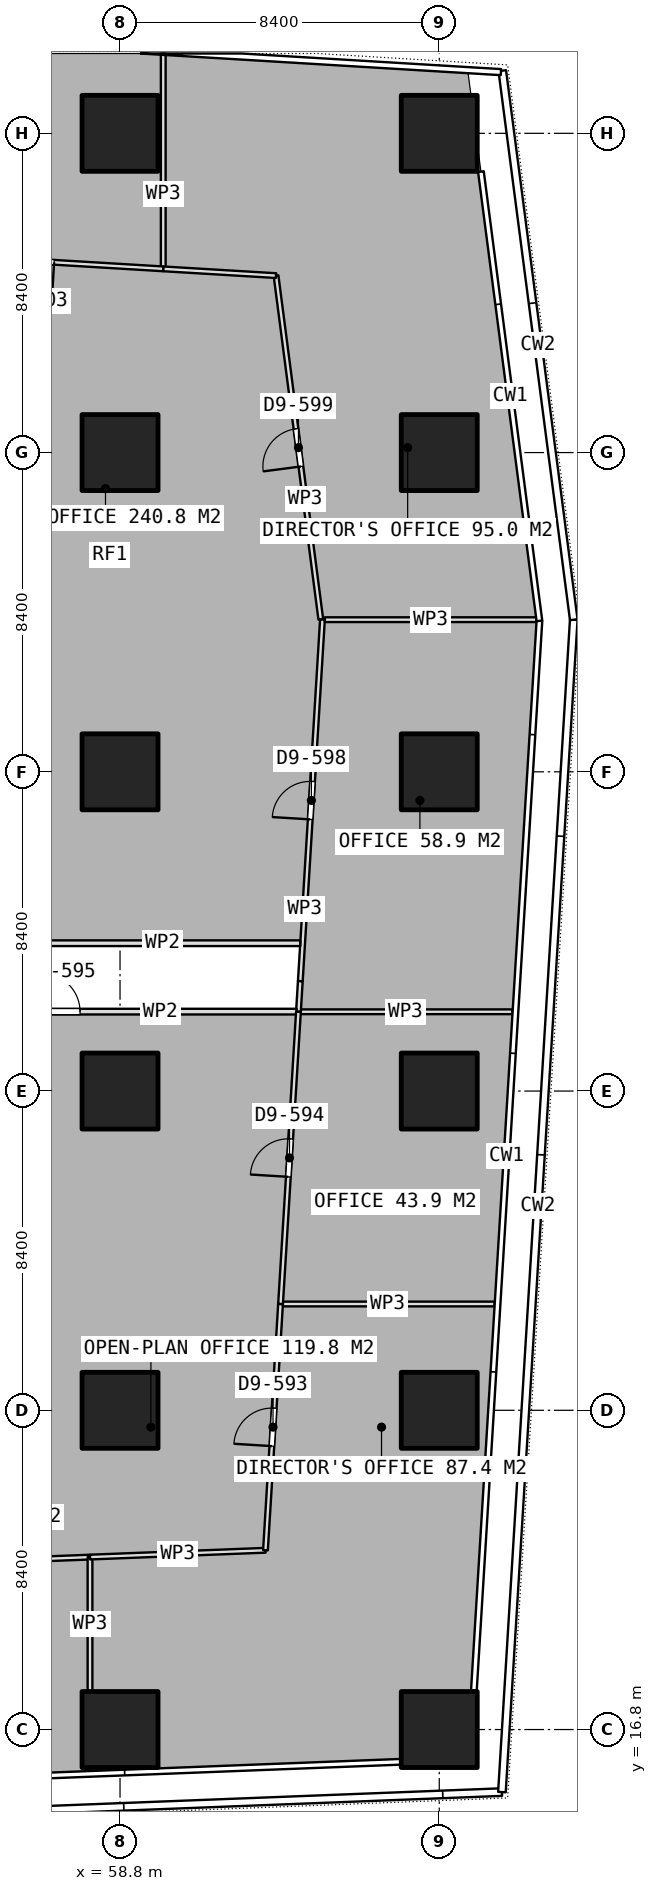
"""IFC4 building model, lengths in metres.
Left out: names, types, materials, properties, quantities, classifications, styles, units other than length and angle.
Written with IfcOpenShell. Run it as: python <this file> out.ifc"""

import sys

from ifc_helpers import new_model, si_unit, direction, frame, frame_2d, origin, origin_2d, place, context, subcontext, project, spatial, rectangle, extrude, element, fill, save


model = new_model("IFC4")
c1 = context("Model", 3, precision=1e-05, world=origin(), true_north=direction((0.0, 1.0)))
c2 = subcontext(c1, "Body", "Model", "MODEL_VIEW")
j1 = project(units=[si_unit("LENGTHUNIT", "METRE"), si_unit("PLANEANGLEUNIT", "RADIAN")], contexts=[c1])
p1 = place(None, origin())
s1 = spatial("IfcSite", under=j1, at=p1, CompositionType="ELEMENT")
p2 = place(p1, origin())
s2 = spatial("IfcBuilding", under=s1, at=p2, CompositionType="ELEMENT")
p3 = place(p2, frame((0.0, 0.0, 147.8)))
s3 = spatial("IfcBuildingStorey", under=s2, at=p3, CompositionType="ELEMENT", Elevation=147.8)
for number, where, z_axis, x_axis in (
    (1, (58.8, 16.8, 0.0), (0.0, 0.0, 1.0), (1.0, 0.0, 0.0)),
    (2, (58.8, 25.2, 0.0), (0.0, 0.0, 1.0), (1.0, 0.0, 0.0)),
    (3, (58.8, 33.6, 0.0), (0.0, 0.0, 1.0), (1.0, 0.0, 0.0)),
    (4, (58.8, 42.0, 0.0), (0.0, 0.0, 1.0), (1.0, 0.0, 0.0)),
    (5, (58.8, 50.4, 0.0), (0.0, 0.0, 1.0), (1.0, 0.0, 0.0)),
    (6, (58.8, 58.8, 0.0), (0.0, 0.0, 1.0), (1.0, 0.0, 0.0)),
    (7, (67.2, 16.8, 0.0), (0.0, 0.0, 1.0), (1.0, 0.0, 0.0)),
    (8, (67.2, 25.2, 0.0), (0.0, 0.0, 1.0), (1.0, 0.0, 0.0)),
    (9, (67.2, 33.6, 0.0), (0.0, 0.0, 1.0), (1.0, 0.0, 0.0)),
    (10, (67.2, 42.0, 0.0), (0.0, 0.0, 1.0), (1.0, 0.0, 0.0)),
    (11, (67.2, 50.4, 0.0), (0.0, 0.0, 1.0), (1.0, 0.0, 0.0)),
    (12, (67.2, 58.8, 0.0), (0.0, 0.0, 1.0), (1.0, 0.0, 0.0)),
):
    element("IfcColumn", number, at=place(p3, frame(where, z_axis=z_axis, x_axis=x_axis)), inside=s3, PredefinedType="COLUMN", context=c2, shape_type="SweptSolid", body=[
        extrude(rectangle(XDim=2.0, YDim=2.0, at=origin_2d()), origin(), (0.0, 0.0, 1.0), 3.75),
    ])
p4 = place(p3, frame((56.475, 21.278, 0.0), z_axis=(0.0, 0.0, 1.0), x_axis=(0.999266096652, 0.038304935469, 0.0)))
e13 = element("IfcWall", 13, at=p4, inside=s3, PredefinedType="PARTITIONING", context=c2, shape_type="SweptSolid", body=[
    extrude(rectangle(XDim=1.536, YDim=0.125, at=frame_2d((0.768, 0.0))), origin(), (0.0, 0.0, 1.0), 3.5),
])
p5 = place(p3, frame((58.01, 21.337, 0.0), z_axis=(0.0, 0.0, 1.0), x_axis=(0.0, -1.0, 0.0)))
e14 = element("IfcWall", 14, at=p5, inside=s3, PredefinedType="PARTITIONING", context=c2, shape_type="SweptSolid", body=[
    extrude(rectangle(XDim=3.517, YDim=0.125, at=frame_2d((1.758, 0.0))), origin(), (0.0, 0.0, 1.0), 3.5),
])
p6 = place(p3, frame((63.024, 27.997, 0.0), z_axis=(0.0, 0.0, 1.0), x_axis=(1.0, 0.0, 0.0)))
e15 = element("IfcWall", 15, at=p6, inside=s3, PredefinedType="PARTITIONING", context=c2, shape_type="SweptSolid", body=[
    extrude(rectangle(XDim=5.631, YDim=0.125, at=frame_2d((2.815, 0.0))), origin(), (0.0, 0.0, 1.0), 3.5),
])
p7 = place(p3, frame((58.011, 21.338, 0.0), z_axis=(0.0, 0.0, 1.0), x_axis=(0.999247292376, 0.038792379151, 0.0)))
e16 = element("IfcWall", 16, at=p7, inside=s3, PredefinedType="PARTITIONING", context=c2, shape_type="SweptSolid", body=[
    extrude(rectangle(XDim=4.619, YDim=0.125, at=frame_2d((2.31, 0.0))), origin(), (0.0, 0.0, 1.0), 3.5),
])
p8 = place(p3, frame((62.627, 21.517, 0.0), z_axis=(0.0, 0.0, 1.0), x_axis=(0.061146763842, 0.998128785915, 0.0)))
e17 = element("IfcWall", 17, at=p8, inside=s3, PredefinedType="PARTITIONING", context=c2, shape_type="SweptSolid", body=[
    extrude(rectangle(XDim=6.492, YDim=0.125, at=frame_2d((3.246, 0.0))), origin(), (0.0, 0.0, 1.0), 3.5),
])
p9 = place(p8, frame((2.746, 0.0, 0.0)))
e18 = element("IfcOpeningElement", 18, at=p9, cuts=e17, PredefinedType="OPENING", context=c2, shape_type="SweptSolid", body=[
    extrude(rectangle(XDim=1.0, YDim=2.1, at=frame_2d((0.5, 1.05))), frame((0.0, 0.073, 0.0), z_axis=(0.0, -1.0, 0.0), x_axis=(1.0, 0.0, 0.0)), (0.0, 0.0, 1.0), 0.145),
])
p10 = place(p3, frame((63.024, 27.998, 0.0), z_axis=(0.0, 0.0, 1.0), x_axis=(0.061174508596, 0.998127085845, 0.0)))
e19 = element("IfcWall", 19, at=p10, inside=s3, PredefinedType="PARTITIONING", context=c2, shape_type="SweptSolid", body=[
    extrude(rectangle(XDim=7.702, YDim=0.125, at=frame_2d((3.851, 0.0))), origin(), (0.0, 0.0, 1.0), 3.5),
])
p11 = place(p10, frame((3.351, 0.0, 0.0)))
e20 = element("IfcOpeningElement", 20, at=p11, cuts=e19, PredefinedType="OPENING", context=c2, shape_type="SweptSolid", body=[
    extrude(rectangle(XDim=1.0, YDim=2.1, at=frame_2d((0.5, 1.05))), frame((0.0, 0.073, 0.0), z_axis=(0.0, -1.0, 0.0), x_axis=(1.0, 0.0, 0.0)), (0.0, 0.0, 1.0), 0.145),
])
p12 = place(p3, frame((63.495, 35.686, 0.0), z_axis=(0.0, 0.0, 1.0), x_axis=(1.0, 0.0, 0.0)))
e21 = element("IfcWall", 21, at=p12, inside=s3, PredefinedType="PARTITIONING", context=c2, shape_type="SweptSolid", body=[
    extrude(rectangle(XDim=5.631, YDim=0.125, at=frame_2d((2.815, 0.0))), origin(), (0.0, 0.0, 1.0), 3.5),
])
p13 = place(p3, frame((63.544, 36.491, 0.0), z_axis=(0.0, 0.0, 1.0), x_axis=(0.061131923864, 0.998129694922, 0.0)))
e22 = element("IfcWall", 22, at=p13, inside=s3, PredefinedType="PARTITIONING", context=c2, shape_type="SweptSolid", body=[
    extrude(rectangle(XDim=9.537, YDim=0.125, at=frame_2d((4.769, 0.0))), origin(), (0.0, 0.0, 1.0), 3.5),
])
p14 = place(p13, frame((4.265, 0.0, 0.0)))
e23 = element("IfcOpeningElement", 23, at=p14, cuts=e22, PredefinedType="OPENING", context=c2, shape_type="SweptSolid", body=[
    extrude(rectangle(XDim=1.0, YDim=2.1, at=frame_2d((0.5, 1.05))), frame((0.0, 0.073, 0.0), z_axis=(0.0, -1.0, 0.0), x_axis=(1.0, 0.0, 0.0)), (0.0, 0.0, 1.0), 0.145),
])
p15 = place(p3, frame((64.189, 46.003, 0.0), z_axis=(0.0, 0.0, 1.0), x_axis=(1.0, 0.0, 0.0)))
e24 = element("IfcWall", 24, at=p15, inside=s3, PredefinedType="PARTITIONING", context=c2, shape_type="SweptSolid", body=[
    extrude(rectangle(XDim=5.562, YDim=0.125, at=frame_2d((2.781, 0.0))), origin(), (0.0, 0.0, 1.0), 3.5),
])
p16 = place(p3, frame((63.495, 35.687, 0.0), z_axis=(0.0, 0.0, 1.0), x_axis=(0.060623183924, 0.998160723316, 0.0)))
e25 = element("IfcWall", 25, at=p16, inside=s3, PredefinedType="PARTITIONING", context=c2, shape_type="SweptSolid", body=[
    extrude(rectangle(XDim=0.805, YDim=0.125, at=frame_2d((0.403, 0.0))), origin(), (0.0, 0.0, 1.0), 3.5),
])
p17 = place(p3, frame((59.937, 55.234, 0.0), z_axis=(0.0, 0.0, 1.0), x_axis=(0.0, 1.0, 0.0)))
e26 = element("IfcWall", 26, at=p17, inside=s3, PredefinedType="PARTITIONING", context=c2, shape_type="SweptSolid", body=[
    extrude(rectangle(XDim=5.66, YDim=0.125, at=frame_2d((2.83, 0.0))), origin(), (0.0, 0.0, 1.0), 3.5),
])
p18 = place(p3, frame((64.083, 46.013, 0.0), z_axis=(0.0, 0.0, 1.0), x_axis=(-0.129173227862, 0.991622043525, 0.0)))
e27 = element("IfcWall", 27, at=p18, inside=s3, PredefinedType="PARTITIONING", context=c2, shape_type="SweptSolid", body=[
    extrude(rectangle(XDim=9.119, YDim=0.125, at=frame_2d((4.56, 0.0))), origin(), (0.0, 0.0, 1.0), 3.5),
])
p19 = place(p18, frame((4.055, 0.0, 0.0)))
e28 = element("IfcOpeningElement", 28, at=p19, cuts=e27, PredefinedType="OPENING", context=c2, shape_type="SweptSolid", body=[
    extrude(rectangle(XDim=1.0, YDim=2.1, at=frame_2d((0.5, 1.05))), frame((0.0, 0.073, 0.0), z_axis=(0.0, -1.0, 0.0), x_axis=(1.0, 0.0, 0.0)), (0.0, 0.0, 1.0), 0.145),
])
p20 = place(p3, frame((62.905, 55.056, 0.0), z_axis=(0.0, 0.0, 1.0), x_axis=(-0.998206906615, 0.059857928348, 0.0)))
e29 = element("IfcWall", 29, at=p20, inside=s3, PredefinedType="PARTITIONING", context=c2, shape_type="SweptSolid", body=[
    extrude(rectangle(XDim=2.973, YDim=0.125, at=frame_2d((1.487, 0.0))), origin(), (0.0, 0.0, 1.0), 3.5),
])
p21 = place(p3, frame((59.936, 55.234, 0.0), z_axis=(0.0, 0.0, 1.0), x_axis=(-0.998198743515, 0.059993903398, 0.0)))
e30 = element("IfcWall", 30, at=p21, inside=s3, PredefinedType="PARTITIONING", context=c2, shape_type="SweptSolid", body=[
    extrude(rectangle(XDim=6.751, YDim=0.125, at=frame_2d((3.375, 0.0))), origin(), (0.0, 0.0, 1.0), 3.5),
])
p22 = place(p21, frame((2.876, 0.0, 0.0)))
e31 = element("IfcOpeningElement", 31, at=p22, cuts=e30, PredefinedType="OPENING", context=c2, shape_type="SweptSolid", body=[
    extrude(rectangle(XDim=1.0, YDim=2.1, at=frame_2d((0.5, 1.05))), frame((0.0, 0.073, 0.0), z_axis=(0.0, -1.0, 0.0), x_axis=(1.0, 0.0, 0.0)), (0.0, 0.0, 1.0), 0.145),
])
p23 = place(p3, frame((63.543, 37.49, 0.0), z_axis=(0.0, 0.0, 1.0), x_axis=(-1.0, 0.0, 0.0)))
e32 = element("IfcWall", 32, at=p23, inside=s3, PredefinedType="PARTITIONING", context=c2, shape_type="SweptSolid", body=[
    extrude(rectangle(XDim=10.343, YDim=0.15, at=frame_2d((5.171, 0.0))), origin(), (0.0, 0.0, 1.0), 3.5),
])
p24 = place(p3, frame((53.2, 35.69, 0.0), z_axis=(0.0, 0.0, 1.0), x_axis=(1.0, 0.0, 0.0)))
e33 = element("IfcWall", 33, at=p24, inside=s3, PredefinedType="PARTITIONING", context=c2, shape_type="SweptSolid", body=[
    extrude(rectangle(XDim=10.246, YDim=0.15, at=frame_2d((5.123, 0.0))), origin(), (0.0, 0.0, 1.0), 3.5),
])
p25 = place(p24, frame((3.547, 0.0, 0.0)))
e34 = element("IfcOpeningElement", 34, at=p25, cuts=e33, PredefinedType="OPENING", context=c2, shape_type="SweptSolid", body=[
    extrude(rectangle(XDim=1.0, YDim=2.1, at=frame_2d((0.5, 1.05))), frame((0.0, 0.085, 0.0), z_axis=(0.0, -1.0, 0.0), x_axis=(1.0, 0.0, 0.0)), (0.0, 0.0, 1.0), 0.17),
])
p26 = place(p9, origin())
e35 = element("IfcDoor", 35, at=p26, inside=s3, OperationType="SINGLE_SWING_LEFT", PredefinedType="DOOR", context=c2, shape_type="SweptSolid", body=[
    extrude(rectangle(XDim=1.0, YDim=2.1, at=frame_2d((0.5, 1.05))), frame((0.0, 0.025, 0.0), z_axis=(0.0, -1.0, 0.0), x_axis=(1.0, 0.0, 0.0)), (0.0, 0.0, 1.0), 0.05),
])
fill(e18, e35)
p27 = place(p11, origin())
e36 = element("IfcDoor", 36, at=p27, inside=s3, OperationType="SINGLE_SWING_LEFT", PredefinedType="DOOR", context=c2, shape_type="SweptSolid", body=[
    extrude(rectangle(XDim=1.0, YDim=2.1, at=frame_2d((0.5, 1.05))), frame((0.0, 0.025, 0.0), z_axis=(0.0, -1.0, 0.0), x_axis=(1.0, 0.0, 0.0)), (0.0, 0.0, 1.0), 0.05),
])
fill(e20, e36)
p28 = place(p14, origin())
e37 = element("IfcDoor", 37, at=p28, inside=s3, OperationType="SINGLE_SWING_LEFT", PredefinedType="DOOR", context=c2, shape_type="SweptSolid", body=[
    extrude(rectangle(XDim=1.0, YDim=2.1, at=frame_2d((0.5, 1.05))), frame((0.0, 0.025, 0.0), z_axis=(0.0, -1.0, 0.0), x_axis=(1.0, 0.0, 0.0)), (0.0, 0.0, 1.0), 0.05),
])
fill(e23, e37)
p29 = place(p19, origin())
e38 = element("IfcDoor", 38, at=p29, inside=s3, OperationType="SINGLE_SWING_LEFT", PredefinedType="DOOR", context=c2, shape_type="SweptSolid", body=[
    extrude(rectangle(XDim=1.0, YDim=2.1, at=frame_2d((0.5, 1.05))), frame((0.0, 0.025, 0.0), z_axis=(0.0, -1.0, 0.0), x_axis=(1.0, 0.0, 0.0)), (0.0, 0.0, 1.0), 0.05),
])
fill(e28, e38)
p30 = place(p22, origin())
e39 = element("IfcDoor", 39, at=p30, inside=s3, OperationType="SINGLE_SWING_LEFT", PredefinedType="DOOR", context=c2, shape_type="SweptSolid", body=[
    extrude(rectangle(XDim=1.0, YDim=2.1, at=frame_2d((0.5, 1.05))), frame((0.0, 0.025, 0.0), z_axis=(0.0, -1.0, 0.0), x_axis=(1.0, 0.0, 0.0)), (0.0, 0.0, 1.0), 0.05),
])
fill(e31, e39)
p31 = place(p25, origin())
e40 = element("IfcDoor", 40, at=p31, inside=s3, OperationType="SINGLE_SWING_LEFT", PredefinedType="DOOR", context=c2, shape_type="SweptSolid", body=[
    extrude(rectangle(XDim=1.0, YDim=2.1, at=frame_2d((0.5, 1.05))), frame((0.0, 0.025, 0.0), z_axis=(0.0, -1.0, 0.0), x_axis=(1.0, 0.0, 0.0)), (0.0, 0.0, 1.0), 0.05),
])
fill(e34, e40)
save(model, sys.argv[1])
